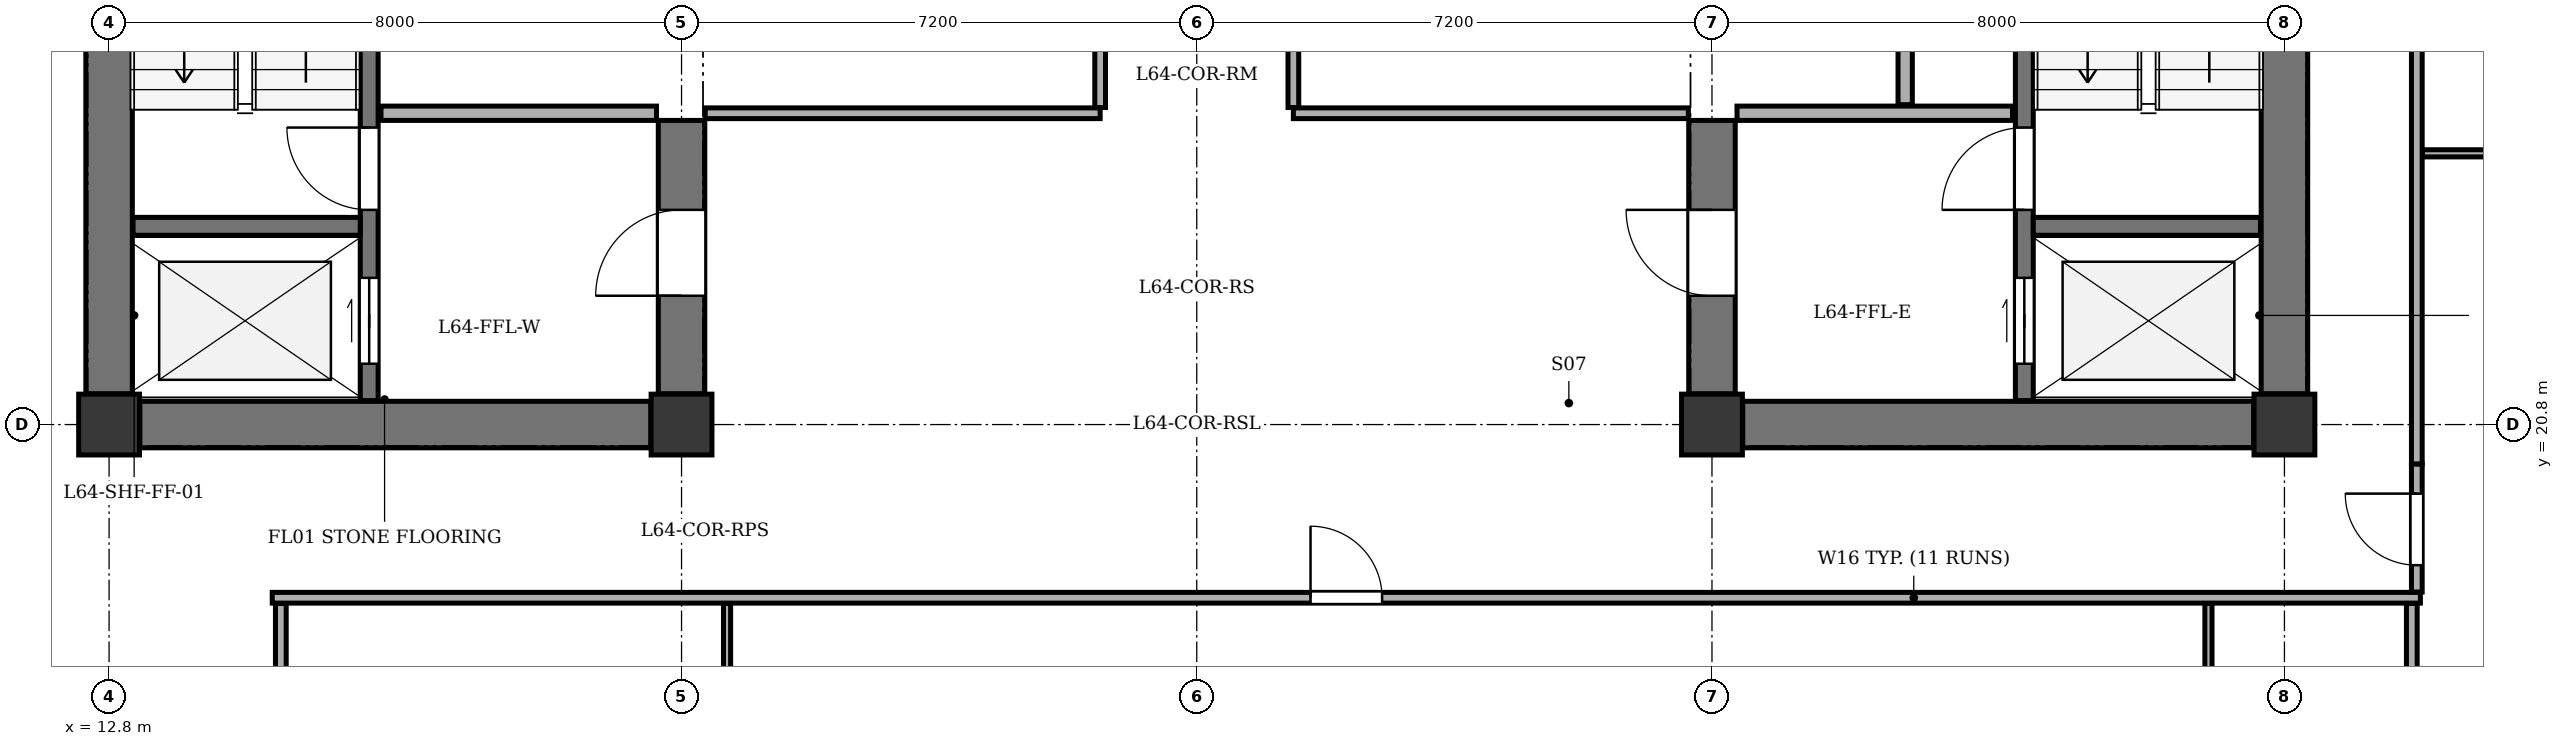
"""IFC4 building model, lengths in metres.
Left out: names, types, materials, properties, quantities, classifications, styles, units other than length and angle.
Written with IfcOpenShell. Run it as: python <this file> out.ifc"""

import sys

from ifc_helpers import new_model, si_unit, direction, frame, frame_2d, origin, origin_2d, place, context, subcontext, project, spatial, rectangle, extrude, element, fill, save


model = new_model("IFC4")
c1 = context("Model", 3, precision=1e-05, world=origin(), true_north=direction((0.0, 1.0)))
c2 = subcontext(c1, "Body", "Model", "MODEL_VIEW")
j1 = project(units=[si_unit("LENGTHUNIT", "METRE"), si_unit("PLANEANGLEUNIT", "RADIAN")], contexts=[c1])
p1 = place(None, origin())
s1 = spatial("IfcSite", under=j1, at=p1, CompositionType="ELEMENT")
p2 = place(p1, origin())
s2 = spatial("IfcBuilding", under=s1, at=p2, CompositionType="ELEMENT")
p3 = place(p2, frame((0.0, 0.0, 244.9)))
s3 = spatial("IfcBuildingStorey", under=s2, at=p3, CompositionType="ELEMENT", Elevation=244.9)
for number, where, z_axis, x_axis in (
    (1, (12.8, 20.8, 0.0), (0.0, 0.0, 1.0), (1.0, 0.0, 0.0)),
    (2, (20.8, 20.8, 0.0), (0.0, 0.0, 1.0), (1.0, 0.0, 0.0)),
    (3, (35.2, 20.8, 0.0), (0.0, 0.0, 1.0), (1.0, 0.0, 0.0)),
    (4, (43.2, 20.8, 0.0), (0.0, 0.0, 1.0), (1.0, 0.0, 0.0)),
):
    element("IfcColumn", number, at=place(p3, frame(where, z_axis=z_axis, x_axis=x_axis)), inside=s3, PredefinedType="COLUMN", context=c2, shape_type="SweptSolid", body=[
        extrude(rectangle(XDim=0.85, YDim=0.85, at=origin_2d()), origin(), (0.0, 0.0, 1.0), 3.4),
    ])
p4 = place(p3, frame((12.8, 21.23, 0.0), z_axis=(0.0, 0.0, 1.0), x_axis=(0.0, 1.0, 0.0)))
e5 = element("IfcWall", 5, at=p4, inside=s3, PredefinedType="SHEAR", context=c2, shape_type="SweptSolid", body=[
    extrude(rectangle(XDim=11.94, YDim=0.65, at=frame_2d((5.97, 0.0))), origin(), (0.0, 0.0, 1.0), 2.95),
])
p5 = place(p3, frame((13.23, 20.8, 0.0), z_axis=(0.0, 0.0, 1.0), x_axis=(1.0, 0.0, 0.0)))
e6 = element("IfcWall", 6, at=p5, inside=s3, PredefinedType="SHEAR", context=c2, shape_type="SweptSolid", body=[
    extrude(rectangle(XDim=7.14, YDim=0.65, at=frame_2d((3.57, 0.0))), origin(), (0.0, 0.0, 1.0), 2.95),
])
p6 = place(p3, frame((20.8, 21.23, 0.0), z_axis=(0.0, 0.0, 1.0), x_axis=(0.0, 1.0, 0.0)))
e7 = element("IfcWall", 7, at=p6, inside=s3, PredefinedType="SHEAR", context=c2, shape_type="SweptSolid", body=[
    extrude(rectangle(XDim=3.82, YDim=0.65, at=frame_2d((1.91, 0.0))), origin(), (0.0, 0.0, 1.0), 2.95),
])
p7 = place(p6, frame((1.37, 0.0, 0.0)))
e8 = element("IfcOpeningElement", 8, at=p7, cuts=e7, PredefinedType="OPENING", context=c2, shape_type="SweptSolid", body=[
    extrude(rectangle(XDim=1.2, YDim=2.15, at=frame_2d((0.6, 1.075))), frame((0.0, 0.335, 0.0), z_axis=(0.0, -1.0, 0.0), x_axis=(1.0, 0.0, 0.0)), (0.0, 0.0, 1.0), 0.67),
])
p8 = place(p3, frame((16.435, 21.135, 0.0), z_axis=(0.0, 0.0, 1.0), x_axis=(0.0, 1.0, 0.0)))
e9 = element("IfcWall", 9, at=p8, inside=s3, PredefinedType="SHEAR", context=c2, shape_type="SweptSolid", body=[
    extrude(rectangle(XDim=12.13, YDim=0.25, at=frame_2d((6.065, 0.0))), origin(), (0.0, 0.0, 1.0), 2.95),
])
p9 = place(p8, frame((0.515, 0.0, 0.0)))
e10 = element("IfcOpeningElement", 10, at=p9, cuts=e9, PredefinedType="OPENING", context=c2, shape_type="SweptSolid", body=[
    extrude(rectangle(XDim=1.2, YDim=2.15, at=frame_2d((0.6, 1.075))), frame((0.0, 0.135, 0.0), z_axis=(0.0, -1.0, 0.0), x_axis=(1.0, 0.0, 0.0)), (0.0, 0.0, 1.0), 0.27),
])
p10 = place(p8, frame((2.665, 0.0, 0.0)))
e11 = element("IfcOpeningElement", 11, at=p10, cuts=e9, PredefinedType="OPENING", context=c2, shape_type="SweptSolid", body=[
    extrude(rectangle(XDim=1.15, YDim=2.15, at=frame_2d((0.575, 1.075))), frame((0.0, 0.135, 0.0), z_axis=(0.0, -1.0, 0.0), x_axis=(1.0, 0.0, 0.0)), (0.0, 0.0, 1.0), 0.27),
])
p11 = place(p3, frame((13.135, 23.57, 0.0), z_axis=(0.0, 0.0, 1.0), x_axis=(1.0, 0.0, 0.0)))
e12 = element("IfcWall", 12, at=p11, inside=s3, PredefinedType="SHEAR", context=c2, shape_type="SweptSolid", body=[
    extrude(rectangle(XDim=3.175, YDim=0.25, at=frame_2d((1.587, 0.0))), origin(), (0.0, 0.0, 1.0), 2.95),
])
p12 = place(p3, frame((16.6, 25.15, 0.0), z_axis=(0.0, 0.0, 1.0), x_axis=(1.0, 0.0, 0.0)))
e13 = element("IfcWall", 13, at=p12, inside=s3, PredefinedType="SOLIDWALL", context=c2, shape_type="SweptSolid", body=[
    extrude(rectangle(XDim=3.85, YDim=0.2, at=frame_2d((1.925, 0.0))), origin(), (0.0, 0.0, 1.0), 2.95),
])
p13 = place(p3, frame((43.2, 21.23, 0.0), z_axis=(0.0, 0.0, 1.0), x_axis=(0.0, 1.0, 0.0)))
e14 = element("IfcWall", 14, at=p13, inside=s3, PredefinedType="SHEAR", context=c2, shape_type="SweptSolid", body=[
    extrude(rectangle(XDim=11.94, YDim=0.65, at=frame_2d((5.97, 0.0))), origin(), (0.0, 0.0, 1.0), 2.95),
])
p14 = place(p3, frame((35.63, 20.8, 0.0), z_axis=(0.0, 0.0, 1.0), x_axis=(1.0, 0.0, 0.0)))
e15 = element("IfcWall", 15, at=p14, inside=s3, PredefinedType="SHEAR", context=c2, shape_type="SweptSolid", body=[
    extrude(rectangle(XDim=7.14, YDim=0.65, at=frame_2d((3.57, 0.0))), origin(), (0.0, 0.0, 1.0), 2.95),
])
p15 = place(p3, frame((35.2, 21.23, 0.0), z_axis=(0.0, 0.0, 1.0), x_axis=(0.0, 1.0, 0.0)))
e16 = element("IfcWall", 16, at=p15, inside=s3, PredefinedType="SHEAR", context=c2, shape_type="SweptSolid", body=[
    extrude(rectangle(XDim=3.82, YDim=0.65, at=frame_2d((1.91, 0.0))), origin(), (0.0, 0.0, 1.0), 2.95),
])
p16 = place(p15, frame((1.37, 0.0, 0.0)))
e17 = element("IfcOpeningElement", 17, at=p16, cuts=e16, PredefinedType="OPENING", context=c2, shape_type="SweptSolid", body=[
    extrude(rectangle(XDim=1.2, YDim=2.15, at=frame_2d((0.6, 1.075))), frame((0.0, 0.335, 0.0), z_axis=(0.0, -1.0, 0.0), x_axis=(1.0, 0.0, 0.0)), (0.0, 0.0, 1.0), 0.67),
])
p17 = place(p3, frame((39.565, 21.135, 0.0), z_axis=(0.0, 0.0, 1.0), x_axis=(0.0, 1.0, 0.0)))
e18 = element("IfcWall", 18, at=p17, inside=s3, PredefinedType="SHEAR", context=c2, shape_type="SweptSolid", body=[
    extrude(rectangle(XDim=12.13, YDim=0.25, at=frame_2d((6.065, 0.0))), origin(), (0.0, 0.0, 1.0), 2.95),
])
p18 = place(p17, frame((0.515, 0.0, 0.0)))
e19 = element("IfcOpeningElement", 19, at=p18, cuts=e18, PredefinedType="OPENING", context=c2, shape_type="SweptSolid", body=[
    extrude(rectangle(XDim=1.2, YDim=2.15, at=frame_2d((0.6, 1.075))), frame((0.0, 0.135, 0.0), z_axis=(0.0, -1.0, 0.0), x_axis=(1.0, 0.0, 0.0)), (0.0, 0.0, 1.0), 0.27),
])
p19 = place(p17, frame((2.665, 0.0, 0.0)))
e20 = element("IfcOpeningElement", 20, at=p19, cuts=e18, PredefinedType="OPENING", context=c2, shape_type="SweptSolid", body=[
    extrude(rectangle(XDim=1.15, YDim=2.15, at=frame_2d((0.575, 1.075))), frame((0.0, 0.135, 0.0), z_axis=(0.0, -1.0, 0.0), x_axis=(1.0, 0.0, 0.0)), (0.0, 0.0, 1.0), 0.27),
])
p20 = place(p3, frame((39.69, 23.57, 0.0), z_axis=(0.0, 0.0, 1.0), x_axis=(1.0, 0.0, 0.0)))
e21 = element("IfcWall", 21, at=p20, inside=s3, PredefinedType="SHEAR", context=c2, shape_type="SweptSolid", body=[
    extrude(rectangle(XDim=3.175, YDim=0.25, at=frame_2d((1.587, 0.0))), origin(), (0.0, 0.0, 1.0), 2.95),
])
p21 = place(p3, frame((35.55, 25.15, 0.0), z_axis=(0.0, 0.0, 1.0), x_axis=(1.0, 0.0, 0.0)))
e22 = element("IfcWall", 22, at=p21, inside=s3, PredefinedType="SOLIDWALL", context=c2, shape_type="SweptSolid", body=[
    extrude(rectangle(XDim=3.85, YDim=0.2, at=frame_2d((1.925, 0.0))), origin(), (0.0, 0.0, 1.0), 2.95),
])
p22 = place(p3, frame((37.9, 25.27, 0.0), z_axis=(0.0, 0.0, 1.0), x_axis=(0.0, 1.0, 0.0)))
e23 = element("IfcWall", 23, at=p22, inside=s3, PredefinedType="SOLIDWALL", context=c2, shape_type="SweptSolid", body=[
    extrude(rectangle(XDim=7.995, YDim=0.2, at=frame_2d((3.998, 0.0))), origin(), (0.0, 0.0, 1.0), 2.95),
])
for number, where, z_axis, x_axis in (
    (24, (21.13, 25.15, 0.0), (0.0, 0.0, 1.0), (1.0, 0.0, 0.0)),
    (25, (29.35, 25.15, 0.0), (0.0, 0.0, 1.0), (1.0, 0.0, 0.0)),
):
    element("IfcWall", number, at=place(p3, frame(where, z_axis=z_axis, x_axis=x_axis)), inside=s3, PredefinedType="PARTITIONING", context=c2, shape_type="SweptSolid", body=[
        extrude(rectangle(XDim=5.52, YDim=0.15, at=frame_2d((2.76, 0.0))), origin(), (0.0, 0.0, 1.0), 2.95),
    ])
p23 = place(p3, frame((26.65, 25.23, 0.0), z_axis=(0.0, 0.0, 1.0), x_axis=(0.0, 1.0, 0.0)))
e26 = element("IfcWall", 26, at=p23, inside=s3, PredefinedType="PARTITIONING", context=c2, shape_type="SweptSolid", body=[
    extrude(rectangle(XDim=5.82, YDim=0.15, at=frame_2d((2.91, 0.0))), origin(), (0.0, 0.0, 1.0), 2.95),
])
p24 = place(p23, frame((2.72, 0.0, 0.0)))
e27 = element("IfcOpeningElement", 27, at=p24, cuts=e26, PredefinedType="OPENING", context=c2, shape_type="SweptSolid", body=[
    extrude(rectangle(XDim=1.0, YDim=2.1, at=frame_2d((0.5, 1.05))), frame((0.0, 0.085, 0.0), z_axis=(0.0, -1.0, 0.0), x_axis=(1.0, 0.0, 0.0)), (0.0, 0.0, 1.0), 0.17),
])
p25 = place(p3, frame((29.35, 25.23, 0.0), z_axis=(0.0, 0.0, 1.0), x_axis=(0.0, 1.0, 0.0)))
e28 = element("IfcWall", 28, at=p25, inside=s3, PredefinedType="PARTITIONING", context=c2, shape_type="SweptSolid", body=[
    extrude(rectangle(XDim=5.82, YDim=0.15, at=frame_2d((2.91, 0.0))), origin(), (0.0, 0.0, 1.0), 2.95),
])
p26 = place(p25, frame((2.72, 0.0, 0.0)))
e29 = element("IfcOpeningElement", 29, at=p26, cuts=e28, PredefinedType="OPENING", context=c2, shape_type="SweptSolid", body=[
    extrude(rectangle(XDim=1.0, YDim=2.1, at=frame_2d((0.5, 1.05))), frame((0.0, 0.085, 0.0), z_axis=(0.0, -1.0, 0.0), x_axis=(1.0, 0.0, 0.0)), (0.0, 0.0, 1.0), 0.17),
])
p27 = place(p3, frame((15.08, 18.38, 0.0), z_axis=(0.0, 0.0, 1.0), x_axis=(1.0, 0.0, 0.0)))
e30 = element("IfcWall", 30, at=p27, inside=s3, PredefinedType="PARTITIONING", context=c2, shape_type="SweptSolid", body=[
    extrude(rectangle(XDim=30.02, YDim=0.15, at=frame_2d((15.01, 0.0))), origin(), (0.0, 0.0, 1.0), 2.95),
])
p28 = place(p27, frame((14.51, 0.0, 0.0)))
e31 = element("IfcOpeningElement", 31, at=p28, cuts=e30, PredefinedType="OPENING", context=c2, shape_type="SweptSolid", body=[
    extrude(rectangle(XDim=1.0, YDim=2.1, at=frame_2d((0.5, 1.05))), frame((0.0, 0.085, 0.0), z_axis=(0.0, -1.0, 0.0), x_axis=(1.0, 0.0, 0.0)), (0.0, 0.0, 1.0), 0.17),
])
p29 = place(p3, frame((15.2, 3.045, 0.0), z_axis=(0.0, 0.0, 1.0), x_axis=(0.0, 1.0, 0.0)))
e32 = element("IfcWall", 32, at=p29, inside=s3, PredefinedType="PARTITIONING", context=c2, shape_type="SweptSolid", body=[
    extrude(rectangle(XDim=15.255, YDim=0.15, at=frame_2d((7.627, 0.0))), origin(), (0.0, 0.0, 1.0), 2.95),
])
p30 = place(p3, frame((42.138, 5.605, 0.0), z_axis=(0.0, 0.0, 1.0), x_axis=(0.0, 1.0, 0.0)))
e33 = element("IfcWall", 33, at=p30, inside=s3, PredefinedType="PARTITIONING", context=c2, shape_type="SweptSolid", body=[
    extrude(rectangle(XDim=12.695, YDim=0.1, at=frame_2d((6.348, 0.0))), origin(), (0.0, 0.0, 1.0), 2.385),
])
p31 = place(p30, frame((5.91, 0.0, 0.0)))
e34 = element("IfcOpeningElement", 34, at=p31, cuts=e33, PredefinedType="OPENING", context=c2, shape_type="SweptSolid", body=[
    extrude(rectangle(XDim=0.9, YDim=2.05, at=frame_2d((0.45, 1.025))), frame((0.0, 0.06, 0.0), z_axis=(0.0, -1.0, 0.0), x_axis=(1.0, 0.0, 0.0)), (0.0, 0.0, 1.0), 0.12),
])
p32 = place(p3, frame((21.436, 5.605, 0.0), z_axis=(0.0, 0.0, 1.0), x_axis=(0.0, 1.0, 0.0)))
e35 = element("IfcWall", 35, at=p32, inside=s3, PredefinedType="PARTITIONING", context=c2, shape_type="SweptSolid", body=[
    extrude(rectangle(XDim=12.695, YDim=0.1, at=frame_2d((6.348, 0.0))), origin(), (0.0, 0.0, 1.0), 2.95),
])
p33 = place(p32, frame((0.605, 0.0, 0.0)))
e36 = element("IfcOpeningElement", 36, at=p33, cuts=e35, PredefinedType="OPENING", context=c2, shape_type="SweptSolid", body=[
    extrude(rectangle(XDim=0.9, YDim=2.05, at=frame_2d((0.45, 1.025))), frame((0.0, 0.06, 0.0), z_axis=(0.0, -1.0, 0.0), x_axis=(1.0, 0.0, 0.0)), (0.0, 0.0, 1.0), 0.12),
])
p34 = place(p3, frame((44.98, 3.045, 0.0), z_axis=(0.0, 0.0, 1.0), x_axis=(0.0, 1.0, 0.0)))
e37 = element("IfcWall", 37, at=p34, inside=s3, PredefinedType="PARTITIONING", context=c2, shape_type="SweptSolid", body=[
    extrude(rectangle(XDim=15.255, YDim=0.15, at=frame_2d((7.627, 0.0))), origin(), (0.0, 0.0, 1.0), 2.385),
])
p35 = place(p3, frame((45.05, 18.46, 0.0), z_axis=(0.0, 0.0, 1.0), x_axis=(0.0, 1.0, 0.0)))
e38 = element("IfcWall", 38, at=p35, inside=s3, PredefinedType="PARTITIONING", context=c2, shape_type="SweptSolid", body=[
    extrude(rectangle(XDim=1.79, YDim=0.15, at=frame_2d((0.895, 0.0))), origin(), (0.0, 0.0, 1.0), 2.385),
])
p36 = place(p35, frame((0.375, 0.0, 0.0)))
e39 = element("IfcOpeningElement", 39, at=p36, cuts=e38, PredefinedType="OPENING", context=c2, shape_type="SweptSolid", body=[
    extrude(rectangle(XDim=1.0, YDim=2.1, at=frame_2d((0.5, 1.05))), frame((0.0, 0.085, 0.0), z_axis=(0.0, -1.0, 0.0), x_axis=(1.0, 0.0, 0.0)), (0.0, 0.0, 1.0), 0.17),
])
p37 = place(p3, frame((45.05, 20.25, 0.0), z_axis=(0.0, 0.0, 1.0), x_axis=(0.0, 1.0, 0.0)))
e40 = element("IfcWall", 40, at=p37, inside=s3, PredefinedType="PARTITIONING", context=c2, shape_type="SweptSolid", body=[
    extrude(rectangle(XDim=13.9, YDim=0.15, at=frame_2d((6.95, 0.0))), origin(), (0.0, 0.0, 1.0), 2.385),
])
p38 = place(p3, frame((45.13, 24.59, 0.0), z_axis=(0.0, 0.0, 1.0), x_axis=(1.0, 0.0, 0.0)))
e41 = element("IfcWall", 41, at=p38, inside=s3, PredefinedType="PARTITIONING", context=c2, shape_type="SweptSolid", body=[
    extrude(rectangle(XDim=10.225, YDim=0.1, at=frame_2d((5.113, 0.0))), origin(), (0.0, 0.0, 1.0), 2.95),
])
p39 = place(p38, frame((2.083, 0.0, 0.0)))
e42 = element("IfcOpeningElement", 42, at=p39, cuts=e41, PredefinedType="OPENING", context=c2, shape_type="SweptSolid", body=[
    extrude(rectangle(XDim=0.85, YDim=2.05, at=frame_2d((0.425, 1.025))), frame((0.0, 0.06, 0.0), z_axis=(0.0, -1.0, 0.0), x_axis=(1.0, 0.0, 0.0)), (0.0, 0.0, 1.0), 0.12),
])
p40 = place(p38, frame((7.078, 0.0, 0.0)))
e43 = element("IfcOpeningElement", 43, at=p40, cuts=e41, PredefinedType="OPENING", context=c2, shape_type="SweptSolid", body=[
    extrude(rectangle(XDim=0.85, YDim=2.05, at=frame_2d((0.425, 1.025))), frame((0.0, 0.06, 0.0), z_axis=(0.0, -1.0, 0.0), x_axis=(1.0, 0.0, 0.0)), (0.0, 0.0, 1.0), 0.12),
])
p41 = place(p7, origin())
e44 = element("IfcDoor", 44, at=p41, inside=s3, OperationType="SINGLE_SWING_LEFT", PredefinedType="DOOR", context=c2, shape_type="SweptSolid", body=[
    extrude(rectangle(XDim=1.2, YDim=2.15, at=frame_2d((0.6, 1.075))), frame((0.0, 0.025, 0.0), z_axis=(0.0, -1.0, 0.0), x_axis=(1.0, 0.0, 0.0)), (0.0, 0.0, 1.0), 0.05),
])
fill(e8, e44)
p42 = place(p9, origin())
e45 = element("IfcDoor", 45, at=p42, inside=s3, OperationType="DOUBLE_DOOR_SLIDING", PredefinedType="DOOR", context=c2, shape_type="SweptSolid", body=[
    extrude(rectangle(XDim=1.2, YDim=2.15, at=frame_2d((0.6, 1.075))), frame((0.0, 0.025, 0.0), z_axis=(0.0, -1.0, 0.0), x_axis=(1.0, 0.0, 0.0)), (0.0, 0.0, 1.0), 0.05),
])
fill(e10, e45)
p43 = place(p10, origin())
e46 = element("IfcDoor", 46, at=p43, inside=s3, OperationType="SINGLE_SWING_RIGHT", PredefinedType="DOOR", context=c2, shape_type="SweptSolid", body=[
    extrude(rectangle(XDim=1.15, YDim=2.15, at=frame_2d((0.575, 1.075))), frame((0.0, 0.025, 0.0), z_axis=(0.0, -1.0, 0.0), x_axis=(1.0, 0.0, 0.0)), (0.0, 0.0, 1.0), 0.05),
])
fill(e11, e46)
p44 = place(p16, origin())
e47 = element("IfcDoor", 47, at=p44, inside=s3, OperationType="SINGLE_SWING_RIGHT", PredefinedType="DOOR", context=c2, shape_type="SweptSolid", body=[
    extrude(rectangle(XDim=1.2, YDim=2.15, at=frame_2d((0.6, 1.075))), frame((0.0, 0.025, 0.0), z_axis=(0.0, -1.0, 0.0), x_axis=(1.0, 0.0, 0.0)), (0.0, 0.0, 1.0), 0.05),
])
fill(e17, e47)
p45 = place(p18, origin())
e48 = element("IfcDoor", 48, at=p45, inside=s3, OperationType="DOUBLE_DOOR_SLIDING", PredefinedType="DOOR", context=c2, shape_type="SweptSolid", body=[
    extrude(rectangle(XDim=1.2, YDim=2.15, at=frame_2d((0.6, 1.075))), frame((0.0, 0.025, 0.0), z_axis=(0.0, -1.0, 0.0), x_axis=(1.0, 0.0, 0.0)), (0.0, 0.0, 1.0), 0.05),
])
fill(e19, e48)
p46 = place(p19, origin())
e49 = element("IfcDoor", 49, at=p46, inside=s3, OperationType="SINGLE_SWING_LEFT", PredefinedType="DOOR", context=c2, shape_type="SweptSolid", body=[
    extrude(rectangle(XDim=1.15, YDim=2.15, at=frame_2d((0.575, 1.075))), frame((0.0, 0.025, 0.0), z_axis=(0.0, -1.0, 0.0), x_axis=(1.0, 0.0, 0.0)), (0.0, 0.0, 1.0), 0.05),
])
fill(e20, e49)
p47 = place(p28, origin())
e50 = element("IfcDoor", 50, at=p47, inside=s3, OperationType="SINGLE_SWING_LEFT", PredefinedType="DOOR", context=c2, shape_type="SweptSolid", body=[
    extrude(rectangle(XDim=1.0, YDim=2.1, at=frame_2d((0.5, 1.05))), frame((0.0, 0.025, 0.0), z_axis=(0.0, -1.0, 0.0), x_axis=(1.0, 0.0, 0.0)), (0.0, 0.0, 1.0), 0.05),
])
fill(e31, e50)
p48 = place(p36, origin())
e51 = element("IfcDoor", 51, at=p48, inside=s3, OperationType="SINGLE_SWING_RIGHT", PredefinedType="DOOR", context=c2, shape_type="SweptSolid", body=[
    extrude(rectangle(XDim=1.0, YDim=2.1, at=frame_2d((0.5, 1.05))), frame((0.0, 0.025, 0.0), z_axis=(0.0, -1.0, 0.0), x_axis=(1.0, 0.0, 0.0)), (0.0, 0.0, 1.0), 0.05),
])
fill(e39, e51)
save(model, sys.argv[1])
